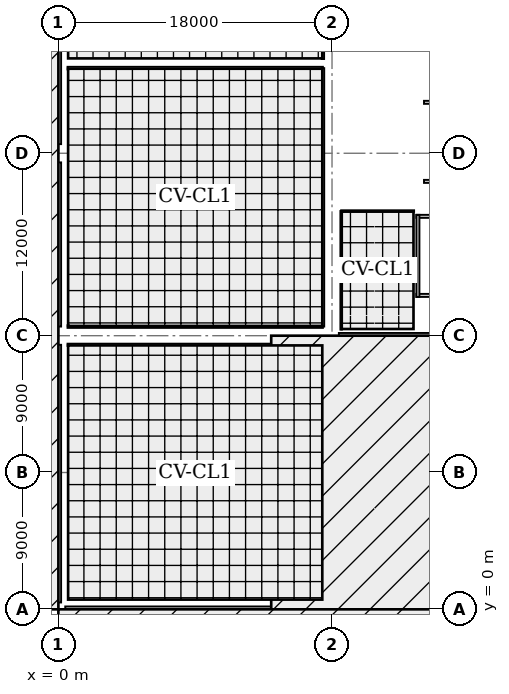
"""IFC4 building model, lengths in metres.
Left out: names, types, materials, properties, quantities, classifications, styles, units other than length and angle.
Written with IfcOpenShell. Run it as: python <this file> out.ifc"""

import sys

from ifc_helpers import new_model, si_unit, direction, frame, frame_2d, origin, origin_2d, place, context, subcontext, project, spatial, rectangle, circle, i_section, extrude, element, fill, save


model = new_model("IFC4")
c1 = context("Model", 3, precision=1e-05, world=origin(), true_north=direction((0.0, 1.0)))
c2 = subcontext(c1, "Body", "Model", "MODEL_VIEW")
j1 = project(units=[si_unit("LENGTHUNIT", "METRE"), si_unit("PLANEANGLEUNIT", "RADIAN")], contexts=[c1])
p1 = place(None, origin())
s1 = spatial("IfcSite", under=j1, at=p1, CompositionType="ELEMENT")
p2 = place(p1, origin())
s2 = spatial("IfcBuilding", under=s1, at=p2, CompositionType="ELEMENT")
p3 = place(p2, origin())
s3 = spatial("IfcBuildingStorey", under=s2, at=p3, CompositionType="ELEMENT", Elevation=0.0)
for number, where, z_axis, x_axis in (
    (1, (0.0, 0.0, 0.0), (0.0, 0.0, 1.0), (1.0, 0.0, 0.0)),
    (2, (0.0, 9.0, 0.0), (0.0, 0.0, 1.0), (1.0, 0.0, 0.0)),
):
    element("IfcColumn", number, at=place(p3, frame(where, z_axis=z_axis, x_axis=x_axis)), inside=s3, PredefinedType="COLUMN", context=c2, shape_type="SweptSolid", body=[
        extrude(rectangle(XDim=0.9, YDim=0.9, at=origin_2d()), origin(), (0.0, 0.0, 1.0), 6.6),
    ])
for number, where, z_axis, x_axis in (
    (3, (0.0, 18.0, 0.0), (0.0, 0.0, 1.0), (1.0, 0.0, 0.0)),
    (4, (0.0, 30.0, 0.0), (0.0, 0.0, 1.0), (1.0, 0.0, 0.0)),
    (5, (0.0, 36.0, 0.0), (0.0, 0.0, 1.0), (1.0, 0.0, 0.0)),
):
    element("IfcColumn", number, at=place(p3, frame(where, z_axis=z_axis, x_axis=x_axis)), inside=s3, PredefinedType="COLUMN", context=c2, shape_type="SweptSolid", body=[
        extrude(rectangle(XDim=1.6, YDim=1.2, at=origin_2d()), origin(), (0.0, 0.0, 1.0), 6.6),
    ])
for number, where, z_axis, x_axis in (
    (6, (18.0, 0.0, 0.0), (0.0, 0.0, 1.0), (1.0, 0.0, 0.0)),
    (7, (18.0, 9.0, 0.0), (0.0, 0.0, 1.0), (1.0, 0.0, 0.0)),
):
    element("IfcColumn", number, at=place(p3, frame(where, z_axis=z_axis, x_axis=x_axis)), inside=s3, PredefinedType="COLUMN", context=c2, shape_type="SweptSolid", body=[
        extrude(rectangle(XDim=0.9, YDim=0.9, at=origin_2d()), origin(), (0.0, 0.0, 1.0), 6.6),
    ])
for number, where, z_axis, x_axis in (
    (8, (18.0, 18.0, 0.0), (0.0, 0.0, 1.0), (1.0, 0.0, 0.0)),
    (9, (18.0, 30.0, 0.0), (0.0, 0.0, 1.0), (1.0, 0.0, 0.0)),
    (10, (18.0, 36.0, 0.0), (0.0, 0.0, 1.0), (1.0, 0.0, 0.0)),
):
    element("IfcColumn", number, at=place(p3, frame(where, z_axis=z_axis, x_axis=x_axis)), inside=s3, PredefinedType="COLUMN", context=c2, shape_type="SweptSolid", body=[
        extrude(circle(Radius=0.45, at=origin_2d()), origin(), (0.0, 0.0, 1.0), 6.6),
    ])
for number, where, z_axis, x_axis in (
    (11, (18.0, 3.2, 0.0), (0.0, 0.0, 1.0), (1.0, 0.0, 0.0)),
    (12, (18.0, 10.0, 0.0), (0.0, 0.0, 1.0), (1.0, 0.0, 0.0)),
):
    element("IfcColumn", number, at=place(p3, frame(where, z_axis=z_axis, x_axis=x_axis)), inside=s3, PredefinedType="COLUMN", context=c2, shape_type="SweptSolid", body=[
        extrude(i_section(OverallWidth=0.35, OverallDepth=0.35, WebThickness=0.012, FlangeThickness=0.019, FilletRadius=0.02, at=origin_2d()), origin(), (0.0, 0.0, 1.0), 7.62),
    ])
p4 = place(p3, frame((35.55, 18.0, 0.0), z_axis=(0.0, 0.0, 1.0), x_axis=(-1.0, 0.0, 0.0)))
e13 = element("IfcWall", 13, at=p4, inside=s3, PredefinedType="SOLIDWALL", context=c2, shape_type="SweptSolid", body=[
    extrude(rectangle(XDim=17.1, YDim=0.36, at=frame_2d((8.55, 0.0))), origin(), (0.0, 0.0, 1.0), 5.595),
])
p5 = place(p4, frame((3.25, 0.0, 0.0)))
e14 = element("IfcOpeningElement", 14, at=p5, cuts=e13, PredefinedType="OPENING", context=c2, shape_type="SweptSolid", body=[
    extrude(rectangle(XDim=2.4, YDim=2.5, at=frame_2d((1.2, 1.25))), frame((0.0, 0.19, 0.0), z_axis=(0.0, -1.0, 0.0), x_axis=(1.0, 0.0, 0.0)), (0.0, 0.0, 1.0), 0.38),
])
p6 = place(p4, frame((7.35, 0.0, 0.0)))
e15 = element("IfcOpeningElement", 15, at=p6, cuts=e13, PredefinedType="OPENING", context=c2, shape_type="SweptSolid", body=[
    extrude(rectangle(XDim=2.4, YDim=2.5, at=frame_2d((1.2, 1.25))), frame((0.0, 0.19, 0.0), z_axis=(0.0, -1.0, 0.0), x_axis=(1.0, 0.0, 0.0)), (0.0, 0.0, 1.0), 0.38),
])
p7 = place(p4, frame((11.15, 0.0, 0.95)))
e16 = element("IfcOpeningElement", 16, at=p7, cuts=e13, PredefinedType="OPENING", context=c2, shape_type="SweptSolid", body=[
    extrude(rectangle(XDim=3.0, YDim=2.1, at=frame_2d((1.5, 1.05))), frame((0.0, 0.19, 0.0), z_axis=(0.0, -1.0, 0.0), x_axis=(1.0, 0.0, 0.0)), (0.0, 0.0, 1.0), 0.38),
])
p8 = place(p3, frame((17.55, 0.0, 0.0), z_axis=(0.0, 0.0, 1.0), x_axis=(-1.0, 0.0, 0.0)))
e17 = element("IfcWall", 17, at=p8, inside=s3, PredefinedType="SOLIDWALL", context=c2, shape_type="SweptSolid", body=[
    extrude(rectangle(XDim=17.1, YDim=0.38, at=frame_2d((8.55, 0.0))), origin(), (0.0, 0.0, 1.0), 5.79),
])
p9 = place(p8, frame((3.55, 0.0, 0.0)))
e18 = element("IfcOpeningElement", 18, at=p9, cuts=e17, PredefinedType="OPENING", context=c2, shape_type="SweptSolid", body=[
    extrude(rectangle(XDim=1.8, YDim=2.35, at=frame_2d((0.9, 1.175))), frame((0.0, 0.2, 0.0), z_axis=(0.0, -1.0, 0.0), x_axis=(1.0, 0.0, 0.0)), (0.0, 0.0, 1.0), 0.4),
])
p10 = place(p8, frame((7.5, 0.0, 0.95)))
e19 = element("IfcOpeningElement", 19, at=p10, cuts=e17, PredefinedType="OPENING", context=c2, shape_type="SweptSolid", body=[
    extrude(rectangle(XDim=2.1, YDim=2.0, at=frame_2d((1.05, 1.0))), frame((0.0, 0.2, 0.0), z_axis=(0.0, -1.0, 0.0), x_axis=(1.0, 0.0, 0.0)), (0.0, 0.0, 1.0), 0.4),
])
p11 = place(p8, frame((11.75, 0.0, 0.95)))
e20 = element("IfcOpeningElement", 20, at=p11, cuts=e17, PredefinedType="OPENING", context=c2, shape_type="SweptSolid", body=[
    extrude(rectangle(XDim=1.8, YDim=2.0, at=frame_2d((0.9, 1.0))), frame((0.0, 0.2, 0.0), z_axis=(0.0, -1.0, 0.0), x_axis=(1.0, 0.0, 0.0)), (0.0, 0.0, 1.0), 0.4),
])
p12 = place(p3, frame((18.0, 17.55, 0.0), z_axis=(0.0, 0.0, 1.0), x_axis=(0.0, -1.0, 0.0)))
e21 = element("IfcWall", 21, at=p12, inside=s3, PredefinedType="SOLIDWALL", context=c2, shape_type="SweptSolid", body=[
    extrude(rectangle(XDim=17.1, YDim=0.34, at=frame_2d((8.55, 0.0))), origin(), (0.0, 0.0, 1.0), 5.595),
])
p13 = place(p12, frame((3.25, 0.0, 0.0)))
e22 = element("IfcOpeningElement", 22, at=p13, cuts=e21, PredefinedType="OPENING", context=c2, shape_type="SweptSolid", body=[
    extrude(rectangle(XDim=2.4, YDim=2.5, at=frame_2d((1.2, 1.25))), frame((0.0, 0.18, 0.0), z_axis=(0.0, -1.0, 0.0), x_axis=(1.0, 0.0, 0.0)), (0.0, 0.0, 1.0), 0.36),
])
p14 = place(p12, frame((9.55, 0.0, 0.95)))
e23 = element("IfcOpeningElement", 23, at=p14, cuts=e21, PredefinedType="OPENING", context=c2, shape_type="SweptSolid", body=[
    extrude(rectangle(XDim=1.6, YDim=1.9, at=frame_2d((0.8, 0.95))), frame((0.0, 0.18, 0.0), z_axis=(0.0, -1.0, 0.0), x_axis=(1.0, 0.0, 0.0)), (0.0, 0.0, 1.0), 0.36),
])
p15 = place(p3, frame((0.0, 0.45, 0.0), z_axis=(0.0, 0.0, 1.0), x_axis=(0.0, 1.0, 0.0)))
e24 = element("IfcWall", 24, at=p15, inside=s3, PredefinedType="SOLIDWALL", context=c2, shape_type="SweptSolid", body=[
    extrude(rectangle(XDim=16.95, YDim=0.36, at=frame_2d((8.475, 0.0))), origin(), (0.0, 0.0, 1.0), 5.67),
])
p16 = place(p15, frame((3.25, 0.0, 0.0)))
e25 = element("IfcOpeningElement", 25, at=p16, cuts=e24, PredefinedType="OPENING", context=c2, shape_type="SweptSolid", body=[
    extrude(rectangle(XDim=2.4, YDim=2.5, at=frame_2d((1.2, 1.25))), frame((0.0, 0.19, 0.0), z_axis=(0.0, -1.0, 0.0), x_axis=(1.0, 0.0, 0.0)), (0.0, 0.0, 1.0), 0.38),
])
p17 = place(p15, frame((9.55, 0.0, 0.95)))
e26 = element("IfcOpeningElement", 26, at=p17, cuts=e24, PredefinedType="OPENING", context=c2, shape_type="SweptSolid", body=[
    extrude(rectangle(XDim=3.0, YDim=2.1, at=frame_2d((1.5, 1.05))), frame((0.0, 0.19, 0.0), z_axis=(0.0, -1.0, 0.0), x_axis=(1.0, 0.0, 0.0)), (0.0, 0.0, 1.0), 0.38),
])
p18 = place(p15, frame((13.1, 0.0, 0.95)))
e27 = element("IfcOpeningElement", 27, at=p18, cuts=e24, PredefinedType="OPENING", context=c2, shape_type="SweptSolid", body=[
    extrude(rectangle(XDim=2.7, YDim=2.1, at=frame_2d((1.35, 1.05))), frame((0.0, 0.19, 0.0), z_axis=(0.0, -1.0, 0.0), x_axis=(1.0, 0.0, 0.0)), (0.0, 0.0, 1.0), 0.38),
])
p19 = place(p3, frame((0.0, 18.6, 0.0), z_axis=(0.0, 0.0, 1.0), x_axis=(0.0, 1.0, 0.0)))
e28 = element("IfcWall", 28, at=p19, inside=s3, PredefinedType="SOLIDWALL", context=c2, shape_type="SweptSolid", body=[
    extrude(rectangle(XDim=10.8, YDim=0.36, at=frame_2d((5.4, 0.0))), origin(), (0.0, 0.0, 1.0), 5.67),
])
p20 = place(p19, frame((2.467, 0.0, 0.0)))
e29 = element("IfcOpeningElement", 29, at=p20, cuts=e28, PredefinedType="OPENING", context=c2, shape_type="SweptSolid", body=[
    extrude(rectangle(XDim=2.4, YDim=2.5, at=frame_2d((1.2, 1.25))), frame((0.0, 0.19, 0.0), z_axis=(0.0, -1.0, 0.0), x_axis=(1.0, 0.0, 0.0)), (0.0, 0.0, 1.0), 0.38),
])
p21 = place(p19, frame((5.933, 0.0, 0.95)))
e30 = element("IfcOpeningElement", 30, at=p21, cuts=e28, PredefinedType="OPENING", context=c2, shape_type="SweptSolid", body=[
    extrude(rectangle(XDim=2.4, YDim=2.1, at=frame_2d((1.2, 1.05))), frame((0.0, 0.19, 0.0), z_axis=(0.0, -1.0, 0.0), x_axis=(1.0, 0.0, 0.0)), (0.0, 0.0, 1.0), 0.38),
])
p22 = place(p3, frame((0.0, 30.6, 0.0), z_axis=(0.0, 0.0, 1.0), x_axis=(0.0, 1.0, 0.0)))
e31 = element("IfcWall", 31, at=p22, inside=s3, PredefinedType="SOLIDWALL", context=c2, shape_type="SweptSolid", body=[
    extrude(rectangle(XDim=10.8, YDim=0.36, at=frame_2d((5.4, 0.0))), origin(), (0.0, 0.0, 1.0), 6.225),
])
p23 = place(p22, frame((1.367, 0.0, 0.0)))
e32 = element("IfcOpeningElement", 32, at=p23, cuts=e31, PredefinedType="OPENING", context=c2, shape_type="SweptSolid", body=[
    extrude(rectangle(XDim=2.2, YDim=2.45, at=frame_2d((1.1, 1.225))), frame((0.0, 0.19, 0.0), z_axis=(0.0, -1.0, 0.0), x_axis=(1.0, 0.0, 0.0)), (0.0, 0.0, 1.0), 0.38),
])
p24 = place(p22, frame((6.683, 0.0, 0.95)))
e33 = element("IfcOpeningElement", 33, at=p24, cuts=e31, PredefinedType="OPENING", context=c2, shape_type="SweptSolid", body=[
    extrude(rectangle(XDim=2.1, YDim=2.0, at=frame_2d((1.05, 1.0))), frame((0.0, 0.19, 0.0), z_axis=(0.0, -1.0, 0.0), x_axis=(1.0, 0.0, 0.0)), (0.0, 0.0, 1.0), 0.38),
])
for number, where, z_axis, x_axis in (
    (34, (23.55, 20.65, 0.0), (0.0, 0.0, 1.0), (1.0, 0.0, 0.0)),
    (35, (35.125, 25.85, 0.0), (0.0, 0.0, 1.0), (-1.0, 0.0, 0.0)),
):
    element("IfcWall", number, at=place(p3, frame(where, z_axis=z_axis, x_axis=x_axis)), inside=s3, PredefinedType="SOLIDWALL", context=c2, shape_type="SweptSolid", body=[
        extrude(rectangle(XDim=11.575, YDim=0.2, at=frame_2d((5.788, 0.0))), origin(), (0.0, 0.0, 1.0), 6.32),
    ])
p25 = place(p3, frame((23.65, 25.95, 0.0), z_axis=(0.0, 0.0, 1.0), x_axis=(0.0, -1.0, 0.0)))
e36 = element("IfcWall", 36, at=p25, inside=s3, PredefinedType="SOLIDWALL", context=c2, shape_type="SweptSolid", body=[
    extrude(rectangle(XDim=5.4, YDim=0.2, at=frame_2d((2.7, 0.0))), origin(), (0.0, 0.0, 1.0), 4.4),
])
p26 = place(p25, frame((1.9, 0.0, 0.0)))
e37 = element("IfcOpeningElement", 37, at=p26, cuts=e36, PredefinedType="OPENING", context=c2, shape_type="SweptSolid", body=[
    extrude(rectangle(XDim=1.6, YDim=2.15, at=frame_2d((0.8, 1.075))), frame((0.0, 0.11, 0.0), z_axis=(0.0, -1.0, 0.0), x_axis=(1.0, 0.0, 0.0)), (0.0, 0.0, 1.0), 0.22),
])
for number, where, z_axis, x_axis in (
    (38, (24.05, 28.15, 0.0), (0.0, 0.0, 1.0), (1.0, 0.0, 0.0)),
    (39, (33.225, 33.35, 0.0), (0.0, 0.0, 1.0), (-1.0, 0.0, 0.0)),
):
    element("IfcWall", number, at=place(p3, frame(where, z_axis=z_axis, x_axis=x_axis)), inside=s3, PredefinedType="SOLIDWALL", context=c2, shape_type="SweptSolid", body=[
        extrude(rectangle(XDim=9.175, YDim=0.2, at=frame_2d((4.587, 0.0))), origin(), (0.0, 0.0, 1.0), 6.32),
    ])
p27 = place(p3, frame((18.6, 26.2, 0.0), z_axis=(0.0, 0.0, 1.0), x_axis=(1.0, 0.0, 0.0)))
e40 = element("IfcWall", 40, at=p27, inside=s3, PredefinedType="PARTITIONING", context=c2, shape_type="SweptSolid", body=[
    extrude(rectangle(XDim=4.8, YDim=0.1, at=frame_2d((2.4, 0.0))), origin(), (0.0, 0.0, 1.0), 4.4),
])
p28 = place(p27, frame((1.65, 0.0, 0.0)))
e41 = element("IfcOpeningElement", 41, at=p28, cuts=e40, PredefinedType="OPENING", context=c2, shape_type="SweptSolid", body=[
    extrude(rectangle(XDim=1.5, YDim=2.15, at=frame_2d((0.75, 1.075))), frame((0.0, 0.06, 0.0), z_axis=(0.0, -1.0, 0.0), x_axis=(1.0, 0.0, 0.0)), (0.0, 0.0, 1.0), 0.12),
])
p29 = place(p3, frame((18.6, 18.4, 0.0), z_axis=(0.0, 0.0, 1.0), x_axis=(0.0, 1.0, 0.0)))
e42 = element("IfcWall", 42, at=p29, inside=s3, PredefinedType="PARTITIONING", context=c2, shape_type="SweptSolid", body=[
    extrude(rectangle(XDim=7.8, YDim=0.1, at=frame_2d((3.9, 0.0))), origin(), (0.0, 0.0, 1.0), 4.4),
])
for number, where, z_axis, x_axis in (
    (43, (17.4, 18.6, 0.0), (0.0, 0.0, 1.0), (-1.0, 0.0, 0.0)),
    (44, (0.6, 35.6, 0.0), (0.0, 0.0, 1.0), (1.0, 0.0, 0.0)),
):
    element("IfcWall", number, at=place(p3, frame(where, z_axis=z_axis, x_axis=x_axis)), inside=s3, PredefinedType="PARTITIONING", context=c2, shape_type="SweptSolid", body=[
        extrude(rectangle(XDim=16.8, YDim=0.175, at=frame_2d((8.4, 0.0))), origin(), (0.0, 0.0, 1.0), 4.4),
    ])
p30 = place(p3, frame((17.4, 35.6, 0.0), z_axis=(0.0, 0.0, 1.0), x_axis=(0.0, -1.0, 0.0)))
e45 = element("IfcWall", 45, at=p30, inside=s3, PredefinedType="PARTITIONING", context=c2, shape_type="SweptSolid", body=[
    extrude(rectangle(XDim=17.0, YDim=0.175, at=frame_2d((8.5, 0.0))), origin(), (0.0, 0.0, 1.0), 4.4),
])
p31 = place(p30, frame((7.625, 0.0, 0.0)))
e46 = element("IfcOpeningElement", 46, at=p31, cuts=e45, PredefinedType="OPENING", context=c2, shape_type="SweptSolid", body=[
    extrude(rectangle(XDim=1.75, YDim=2.1, at=frame_2d((0.875, 1.05))), frame((0.0, 0.097, 0.0), z_axis=(0.0, -1.0, 0.0), x_axis=(1.0, 0.0, 0.0)), (0.0, 0.0, 1.0), 0.195),
])
p32 = place(p3, frame((17.4, 53.6, 0.0), z_axis=(0.0, 0.0, 1.0), x_axis=(0.0, -1.0, 0.0)))
e47 = element("IfcWall", 47, at=p32, inside=s3, PredefinedType="PARTITIONING", context=c2, shape_type="SweptSolid", body=[
    extrude(rectangle(XDim=17.4, YDim=0.16, at=frame_2d((8.7, 0.0))), origin(), (0.0, 0.0, 1.0), 4.4),
])
p33 = place(p32, frame((7.825, 0.0, 0.0)))
e48 = element("IfcOpeningElement", 48, at=p33, cuts=e47, PredefinedType="OPENING", context=c2, shape_type="SweptSolid", body=[
    extrude(rectangle(XDim=1.75, YDim=2.1, at=frame_2d((0.875, 1.05))), frame((0.0, 0.09, 0.0), z_axis=(0.0, -1.0, 0.0), x_axis=(1.0, 0.0, 0.0)), (0.0, 0.0, 1.0), 0.18),
])
p34 = place(p3, frame((0.6, 17.4, 0.0), z_axis=(0.0, 0.0, 1.0), x_axis=(1.0, 0.0, 0.0)))
e49 = element("IfcWall", 49, at=p34, inside=s3, PredefinedType="PARTITIONING", context=c2, shape_type="SweptSolid", body=[
    extrude(rectangle(XDim=16.8, YDim=0.15, at=frame_2d((8.4, 0.0))), origin(), (0.0, 0.0, 1.0), 4.4),
])
p35 = place(p34, frame((7.625, 0.0, 0.0)))
e50 = element("IfcOpeningElement", 50, at=p35, cuts=e49, PredefinedType="OPENING", context=c2, shape_type="SweptSolid", body=[
    extrude(rectangle(XDim=1.55, YDim=2.1, at=frame_2d((0.775, 1.05))), frame((0.0, 0.085, 0.0), z_axis=(0.0, -1.0, 0.0), x_axis=(1.0, 0.0, 0.0)), (0.0, 0.0, 1.0), 0.17),
])
p36 = place(p3, frame((17.4, 17.4, 0.0), z_axis=(0.0, 0.0, 1.0), x_axis=(0.0, -1.0, 0.0)))
e51 = element("IfcWall", 51, at=p36, inside=s3, PredefinedType="PARTITIONING", context=c2, shape_type="SweptSolid", body=[
    extrude(rectangle(XDim=16.8, YDim=0.15, at=frame_2d((8.4, 0.0))), origin(), (0.0, 0.0, 1.0), 4.4),
])
p37 = place(p7, origin())
e52 = element("IfcWindow", 52, at=p37, inside=s3, PartitioningType="SINGLE_PANEL", PredefinedType="WINDOW", context=c2, shape_type="SweptSolid", body=[
    extrude(rectangle(XDim=3.0, YDim=2.1, at=frame_2d((1.5, 1.05))), frame((0.0, 0.03, 0.0), z_axis=(0.0, -1.0, 0.0), x_axis=(1.0, 0.0, 0.0)), (0.0, 0.0, 1.0), 0.06),
])
fill(e16, e52)
p38 = place(p9, origin())
e53 = element("IfcDoor", 53, at=p38, inside=s3, OperationType="SINGLE_SWING_RIGHT", PredefinedType="DOOR", context=c2, shape_type="SweptSolid", body=[
    extrude(rectangle(XDim=1.8, YDim=2.35, at=frame_2d((0.9, 1.175))), frame((0.0, 0.025, 0.0), z_axis=(0.0, -1.0, 0.0), x_axis=(1.0, 0.0, 0.0)), (0.0, 0.0, 1.0), 0.05),
])
fill(e18, e53)
p39 = place(p10, origin())
e54 = element("IfcWindow", 54, at=p39, inside=s3, PartitioningType="SINGLE_PANEL", PredefinedType="WINDOW", context=c2, shape_type="SweptSolid", body=[
    extrude(rectangle(XDim=2.1, YDim=2.0, at=frame_2d((1.05, 1.0))), frame((0.0, 0.03, 0.0), z_axis=(0.0, -1.0, 0.0), x_axis=(1.0, 0.0, 0.0)), (0.0, 0.0, 1.0), 0.06),
])
fill(e19, e54)
p40 = place(p11, origin())
e55 = element("IfcWindow", 55, at=p40, inside=s3, PartitioningType="SINGLE_PANEL", PredefinedType="WINDOW", context=c2, shape_type="SweptSolid", body=[
    extrude(rectangle(XDim=1.8, YDim=2.0, at=frame_2d((0.9, 1.0))), frame((0.0, 0.03, 0.0), z_axis=(0.0, -1.0, 0.0), x_axis=(1.0, 0.0, 0.0)), (0.0, 0.0, 1.0), 0.06),
])
fill(e20, e55)
p41 = place(p13, origin())
e56 = element("IfcDoor", 56, at=p41, inside=s3, OperationType="SINGLE_SWING_LEFT", PredefinedType="DOOR", context=c2, shape_type="SweptSolid", body=[
    extrude(rectangle(XDim=2.4, YDim=2.5, at=frame_2d((1.2, 1.25))), frame((0.0, 0.025, 0.0), z_axis=(0.0, -1.0, 0.0), x_axis=(1.0, 0.0, 0.0)), (0.0, 0.0, 1.0), 0.05),
])
fill(e22, e56)
p42 = place(p14, origin())
e57 = element("IfcWindow", 57, at=p42, inside=s3, PartitioningType="SINGLE_PANEL", PredefinedType="WINDOW", context=c2, shape_type="SweptSolid", body=[
    extrude(rectangle(XDim=1.6, YDim=1.9, at=frame_2d((0.8, 0.95))), frame((0.0, 0.03, 0.0), z_axis=(0.0, -1.0, 0.0), x_axis=(1.0, 0.0, 0.0)), (0.0, 0.0, 1.0), 0.06),
])
fill(e23, e57)
p43 = place(p16, origin())
e58 = element("IfcDoor", 58, at=p43, inside=s3, OperationType="SINGLE_SWING_RIGHT", PredefinedType="DOOR", context=c2, shape_type="SweptSolid", body=[
    extrude(rectangle(XDim=2.4, YDim=2.5, at=frame_2d((1.2, 1.25))), frame((0.0, 0.025, 0.0), z_axis=(0.0, -1.0, 0.0), x_axis=(1.0, 0.0, 0.0)), (0.0, 0.0, 1.0), 0.05),
])
fill(e25, e58)
p44 = place(p17, origin())
e59 = element("IfcWindow", 59, at=p44, inside=s3, PartitioningType="SINGLE_PANEL", PredefinedType="WINDOW", context=c2, shape_type="SweptSolid", body=[
    extrude(rectangle(XDim=3.0, YDim=2.1, at=frame_2d((1.5, 1.05))), frame((0.0, 0.03, 0.0), z_axis=(0.0, -1.0, 0.0), x_axis=(1.0, 0.0, 0.0)), (0.0, 0.0, 1.0), 0.06),
])
fill(e26, e59)
p45 = place(p18, origin())
e60 = element("IfcWindow", 60, at=p45, inside=s3, PartitioningType="SINGLE_PANEL", PredefinedType="WINDOW", context=c2, shape_type="SweptSolid", body=[
    extrude(rectangle(XDim=2.7, YDim=2.1, at=frame_2d((1.35, 1.05))), frame((0.0, 0.03, 0.0), z_axis=(0.0, -1.0, 0.0), x_axis=(1.0, 0.0, 0.0)), (0.0, 0.0, 1.0), 0.06),
])
fill(e27, e60)
p46 = place(p20, origin())
e61 = element("IfcDoor", 61, at=p46, inside=s3, OperationType="SINGLE_SWING_LEFT", PredefinedType="DOOR", context=c2, shape_type="SweptSolid", body=[
    extrude(rectangle(XDim=2.4, YDim=2.5, at=frame_2d((1.2, 1.25))), frame((0.0, 0.025, 0.0), z_axis=(0.0, -1.0, 0.0), x_axis=(1.0, 0.0, 0.0)), (0.0, 0.0, 1.0), 0.05),
])
fill(e29, e61)
p47 = place(p21, origin())
e62 = element("IfcWindow", 62, at=p47, inside=s3, PartitioningType="SINGLE_PANEL", PredefinedType="WINDOW", context=c2, shape_type="SweptSolid", body=[
    extrude(rectangle(XDim=2.4, YDim=2.1, at=frame_2d((1.2, 1.05))), frame((0.0, 0.03, 0.0), z_axis=(0.0, -1.0, 0.0), x_axis=(1.0, 0.0, 0.0)), (0.0, 0.0, 1.0), 0.06),
])
fill(e30, e62)
p48 = place(p23, origin())
e63 = element("IfcDoor", 63, at=p48, inside=s3, OperationType="SINGLE_SWING_RIGHT", PredefinedType="DOOR", context=c2, shape_type="SweptSolid", body=[
    extrude(rectangle(XDim=2.2, YDim=2.45, at=frame_2d((1.1, 1.225))), frame((0.0, 0.025, 0.0), z_axis=(0.0, -1.0, 0.0), x_axis=(1.0, 0.0, 0.0)), (0.0, 0.0, 1.0), 0.05),
])
fill(e32, e63)
p49 = place(p26, origin())
e64 = element("IfcDoor", 64, at=p49, inside=s3, OperationType="SINGLE_SWING_RIGHT", PredefinedType="DOOR", context=c2, shape_type="SweptSolid", body=[
    extrude(rectangle(XDim=1.6, YDim=2.15, at=frame_2d((0.8, 1.075))), frame((0.0, 0.025, 0.0), z_axis=(0.0, -1.0, 0.0), x_axis=(1.0, 0.0, 0.0)), (0.0, 0.0, 1.0), 0.05),
])
fill(e37, e64)
p50 = place(p28, origin())
e65 = element("IfcDoor", 65, at=p50, inside=s3, OperationType="SINGLE_SWING_RIGHT", PredefinedType="DOOR", context=c2, shape_type="SweptSolid", body=[
    extrude(rectangle(XDim=1.5, YDim=2.15, at=frame_2d((0.75, 1.075))), frame((0.0, 0.025, 0.0), z_axis=(0.0, -1.0, 0.0), x_axis=(1.0, 0.0, 0.0)), (0.0, 0.0, 1.0), 0.05),
])
fill(e41, e65)
p51 = place(p31, origin())
e66 = element("IfcDoor", 66, at=p51, inside=s3, OperationType="SINGLE_SWING_RIGHT", PredefinedType="DOOR", context=c2, shape_type="SweptSolid", body=[
    extrude(rectangle(XDim=1.75, YDim=2.1, at=frame_2d((0.875, 1.05))), frame((0.0, 0.025, 0.0), z_axis=(0.0, -1.0, 0.0), x_axis=(1.0, 0.0, 0.0)), (0.0, 0.0, 1.0), 0.05),
])
fill(e46, e66)
p52 = place(p35, origin())
e67 = element("IfcDoor", 67, at=p52, inside=s3, OperationType="SINGLE_SWING_RIGHT", PredefinedType="DOOR", context=c2, shape_type="SweptSolid", body=[
    extrude(rectangle(XDim=1.55, YDim=2.1, at=frame_2d((0.775, 1.05))), frame((0.0, 0.025, 0.0), z_axis=(0.0, -1.0, 0.0), x_axis=(1.0, 0.0, 0.0)), (0.0, 0.0, 1.0), 0.05),
])
fill(e50, e67)
save(model, sys.argv[1])
